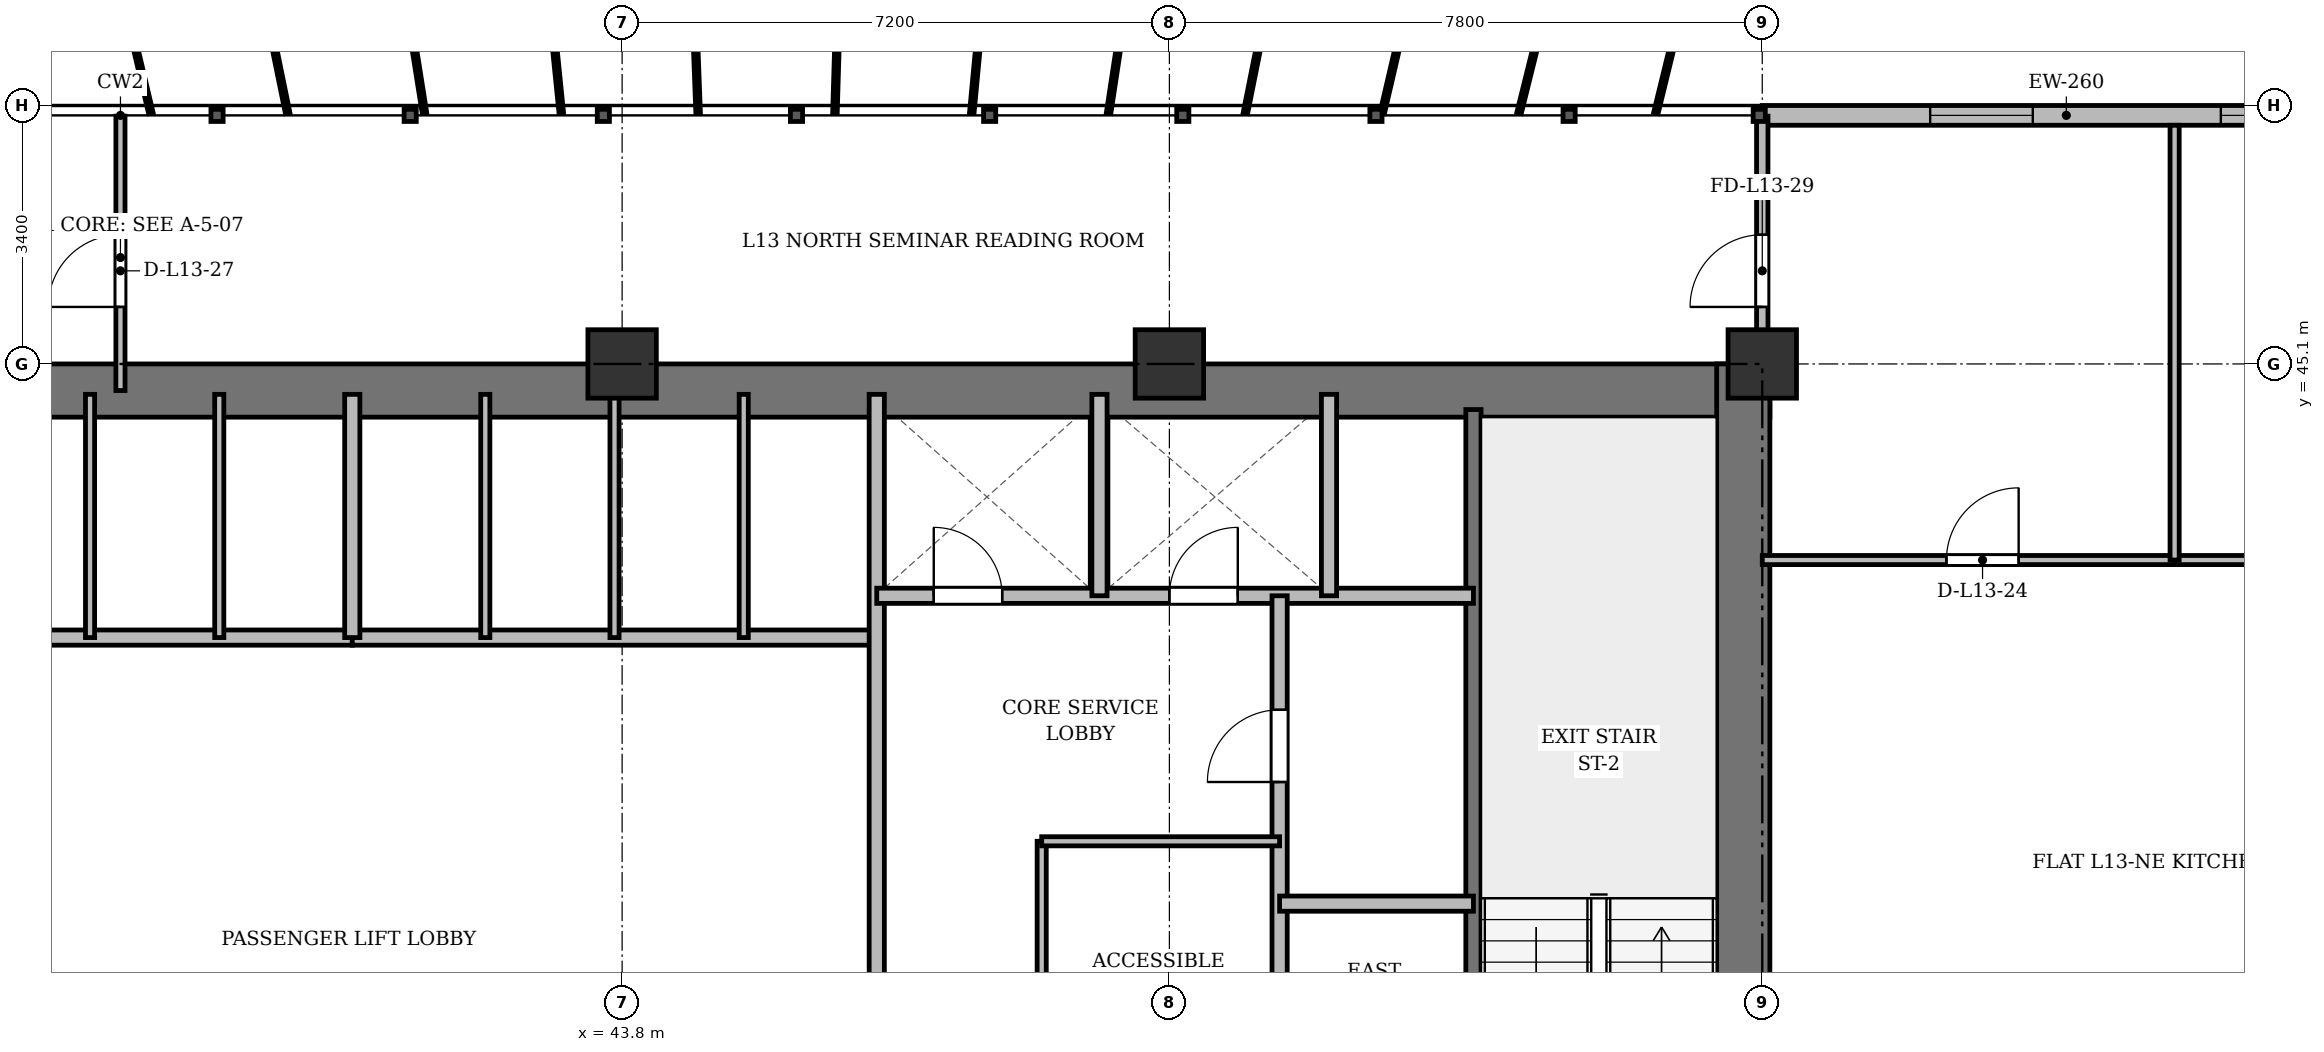
"""IFC4 building model, lengths in metres.
Left out: names, types, materials, properties, quantities, classifications, styles, units other than length and angle.
Written with IfcOpenShell. Run it as: python <this file> out.ifc"""

import sys

from ifc_helpers import new_model, si_unit, direction, frame, frame_2d, origin, origin_2d, place, context, subcontext, project, spatial, rectangle, extrude, source, transform, mapped, element, fill, save


model = new_model("IFC4")
c1 = context("Model", 3, precision=1e-05, world=origin(), true_north=direction((0.0, 1.0)))
c2 = subcontext(c1, "Body", "Model", "MODEL_VIEW")
j1 = project(units=[si_unit("LENGTHUNIT", "METRE"), si_unit("PLANEANGLEUNIT", "RADIAN")], contexts=[c1])
p1 = place(None, origin())
s1 = spatial("IfcSite", under=j1, at=p1, CompositionType="ELEMENT")
p2 = place(p1, origin())
s2 = spatial("IfcBuilding", under=s1, at=p2, CompositionType="ELEMENT")
p3 = place(p2, frame((0.0, 0.0, 52.3)))
s3 = spatial("IfcBuildingStorey", under=s2, at=p3, CompositionType="ELEMENT", Elevation=52.3)
m1 = source(origin(), c2, "Body", "SweptSolid", [
    extrude(rectangle(XDim=0.9, YDim=0.9, at=origin_2d()), origin(), (0.0, 0.0, 1.0), 3.6),
])
for number, where, z_axis, x_axis in (
    (1, (43.8, 45.1, 0.0), (0.0, 0.0, 1.0), (1.0, 0.0, 0.0)),
    (2, (51.0, 45.1, 0.0), (0.0, 0.0, 1.0), (1.0, 0.0, 0.0)),
    (3, (58.8, 45.1, 0.0), (0.0, 0.0, 1.0), (1.0, 0.0, 0.0)),
):
    element("IfcColumn", number, at=place(p3, frame(where, z_axis=z_axis, x_axis=x_axis)), inside=s3, PredefinedType="COLUMN", context=c2, shape_type="MappedRepresentation", body=[
        mapped(m1, transform((0.0, 0.0, 0.0), x_axis=(1.0, 0.0, 0.0), y_axis=(0.0, 1.0, 0.0), z_axis=(0.0, 0.0, 1.0), scale=1.0)),
    ])
p4 = place(p3, frame((58.8, 48.37, 0.0), z_axis=(0.0, 0.0, 1.0), x_axis=(1.0, 0.0, 0.0)))
e4 = element("IfcWall", 4, at=p4, inside=s3, PredefinedType="SOLIDWALL", context=c2, shape_type="SweptSolid", body=[
    extrude(rectangle(XDim=8.0, YDim=0.26, at=frame_2d((4.0, 0.0))), origin(), (0.0, 0.0, 1.0), 3.34),
])
p5 = place(p4, frame((2.209, 0.0, 0.9)))
e5 = element("IfcOpeningElement", 5, at=p5, cuts=e4, PredefinedType="OPENING", context=c2, shape_type="SweptSolid", body=[
    extrude(rectangle(XDim=1.35, YDim=1.5, at=frame_2d((0.675, 0.75))), frame((0.0, 0.14, 0.0), z_axis=(0.0, -1.0, 0.0), x_axis=(1.0, 0.0, 0.0)), (0.0, 0.0, 1.0), 0.28),
])
p6 = place(p4, frame((6.033, 0.0, 0.9)))
e6 = element("IfcOpeningElement", 6, at=p6, cuts=e4, PredefinedType="OPENING", context=c2, shape_type="SweptSolid", body=[
    extrude(rectangle(XDim=1.2, YDim=1.65, at=frame_2d((0.6, 0.825))), frame((0.0, 0.14, 0.0), z_axis=(0.0, -1.0, 0.0), x_axis=(1.0, 0.0, 0.0)), (0.0, 0.0, 1.0), 0.28),
])
p7 = place(p3, frame((15.5, 44.75, 0.0), z_axis=(0.0, 0.0, 1.0), x_axis=(1.0, 0.0, 0.0)))
e7 = element("IfcWall", 7, at=p7, inside=s3, PredefinedType="SHEAR", context=c2, shape_type="SweptSolid", body=[
    extrude(rectangle(XDim=43.4, YDim=0.7, at=frame_2d((21.7, 0.0))), origin(), (0.0, 0.0, 1.0), 3.34),
])
p8 = place(p3, frame((58.55, 33.4, 0.0), z_axis=(0.0, 0.0, 1.0), x_axis=(0.0, 1.0, 0.0)))
e8 = element("IfcWall", 8, at=p8, inside=s3, PredefinedType="SHEAR", context=c2, shape_type="SweptSolid", body=[
    extrude(rectangle(XDim=11.7, YDim=0.7, at=frame_2d((5.85, 0.0))), origin(), (0.0, 0.0, 1.0), 3.34),
])
p9 = place(p3, frame((55.0, 33.4, 0.0), z_axis=(0.0, 0.0, 1.0), x_axis=(0.0, 1.0, 0.0)))
e9 = element("IfcWall", 9, at=p9, inside=s3, PredefinedType="SHEAR", context=c2, shape_type="SweptSolid", body=[
    extrude(rectangle(XDim=11.1, YDim=0.2, at=frame_2d((5.55, 0.0))), origin(), (0.0, 0.0, 1.0), 3.34),
])
p10 = place(p9, frame((0.85, 0.0, 0.0)))
e10 = element("IfcOpeningElement", 10, at=p10, cuts=e9, PredefinedType="OPENING", context=c2, shape_type="SweptSolid", body=[
    extrude(rectangle(XDim=1.1, YDim=2.15, at=frame_2d((0.55, 1.075))), frame((0.0, 0.11, 0.0), z_axis=(0.0, -1.0, 0.0), x_axis=(1.0, 0.0, 0.0)), (0.0, 0.0, 1.0), 0.22),
])
p11 = place(p3, frame((33.35, 41.5, 0.0), z_axis=(0.0, 0.0, 1.0), x_axis=(1.0, 0.0, 0.0)))
e11 = element("IfcWall", 11, at=p11, inside=s3, PredefinedType="SOLIDWALL", context=c2, shape_type="SweptSolid", body=[
    extrude(rectangle(XDim=6.9, YDim=0.2, at=frame_2d((3.45, 0.0))), origin(), (0.0, 0.0, 1.0), 3.34),
])
for number, where, z_axis, x_axis in (
    (12, (36.8, 41.5, 0.0), (0.0, 0.0, 1.0), (0.0, 1.0, 0.0)),
    (13, (38.5, 41.5, 0.0), (0.0, 0.0, 1.0), (0.0, 1.0, 0.0)),
):
    element("IfcWall", number, at=place(p3, frame(where, z_axis=z_axis, x_axis=x_axis)), inside=s3, PredefinedType="PARTITIONING", context=c2, shape_type="SweptSolid", body=[
        extrude(rectangle(XDim=3.2, YDim=0.12, at=frame_2d((1.6, 0.0))), origin(), (0.0, 0.0, 1.0), 3.34),
    ])
p12 = place(p3, frame((40.25, 41.5, 0.0), z_axis=(0.0, 0.0, 1.0), x_axis=(1.0, 0.0, 0.0)))
e14 = element("IfcWall", 14, at=p12, inside=s3, PredefinedType="SOLIDWALL", context=c2, shape_type="SweptSolid", body=[
    extrude(rectangle(XDim=6.9, YDim=0.2, at=frame_2d((3.45, 0.0))), origin(), (0.0, 0.0, 1.0), 2.752),
])
p13 = place(p3, frame((40.25, 41.5, 0.0), z_axis=(0.0, 0.0, 1.0), x_axis=(0.0, 1.0, 0.0)))
e15 = element("IfcWall", 15, at=p13, inside=s3, PredefinedType="SOLIDWALL", context=c2, shape_type="SweptSolid", body=[
    extrude(rectangle(XDim=3.2, YDim=0.2, at=frame_2d((1.6, 0.0))), origin(), (0.0, 0.0, 1.0), 3.34),
])
p14 = place(p3, frame((42.0, 41.5, 0.0), z_axis=(0.0, 0.0, 1.0), x_axis=(0.0, 1.0, 0.0)))
e16 = element("IfcWall", 16, at=p14, inside=s3, PredefinedType="PARTITIONING", context=c2, shape_type="SweptSolid", body=[
    extrude(rectangle(XDim=3.2, YDim=0.12, at=frame_2d((1.6, 0.0))), origin(), (0.0, 0.0, 1.0), 3.34),
])
p15 = place(p3, frame((43.7, 41.5, 0.0), z_axis=(0.0, 0.0, 1.0), x_axis=(0.0, 1.0, 0.0)))
e17 = element("IfcWall", 17, at=p15, inside=s3, PredefinedType="PARTITIONING", context=c2, shape_type="SweptSolid", body=[
    extrude(rectangle(XDim=3.2, YDim=0.12, at=frame_2d((1.6, 0.0))), origin(), (0.0, 0.0, 1.0), 2.752),
])
p16 = place(p3, frame((45.4, 41.5, 0.0), z_axis=(0.0, 0.0, 1.0), x_axis=(0.0, 1.0, 0.0)))
e18 = element("IfcWall", 18, at=p16, inside=s3, PredefinedType="PARTITIONING", context=c2, shape_type="SweptSolid", body=[
    extrude(rectangle(XDim=3.2, YDim=0.12, at=frame_2d((1.6, 0.0))), origin(), (0.0, 0.0, 1.0), 3.34),
])
p17 = place(p3, frame((47.15, 33.4, 0.0), z_axis=(0.0, 0.0, 1.0), x_axis=(0.0, 1.0, 0.0)))
e19 = element("IfcWall", 19, at=p17, inside=s3, PredefinedType="SOLIDWALL", context=c2, shape_type="SweptSolid", body=[
    extrude(rectangle(XDim=11.3, YDim=0.2, at=frame_2d((5.65, 0.0))), origin(), (0.0, 0.0, 1.0), 2.69),
])
p18 = place(p3, frame((47.15, 42.05, 0.0), z_axis=(0.0, 0.0, 1.0), x_axis=(1.0, 0.0, 0.0)))
e20 = element("IfcWall", 20, at=p18, inside=s3, PredefinedType="SOLIDWALL", context=c2, shape_type="SweptSolid", body=[
    extrude(rectangle(XDim=7.85, YDim=0.2, at=frame_2d((3.925, 0.0))), origin(), (0.0, 0.0, 1.0), 2.752),
])
p19 = place(p18, frame((0.75, 0.0, 0.0)))
e21 = element("IfcOpeningElement", 21, at=p19, cuts=e20, PredefinedType="OPENING", context=c2, shape_type="SweptSolid", body=[
    extrude(rectangle(XDim=0.9, YDim=2.1, at=frame_2d((0.45, 1.05))), frame((0.0, 0.11, 0.0), z_axis=(0.0, -1.0, 0.0), x_axis=(1.0, 0.0, 0.0)), (0.0, 0.0, 1.0), 0.22),
])
p20 = place(p18, frame((3.85, 0.0, 0.0)))
e22 = element("IfcOpeningElement", 22, at=p20, cuts=e20, PredefinedType="OPENING", context=c2, shape_type="SweptSolid", body=[
    extrude(rectangle(XDim=0.9, YDim=2.1, at=frame_2d((0.45, 1.05))), frame((0.0, 0.11, 0.0), z_axis=(0.0, -1.0, 0.0), x_axis=(1.0, 0.0, 0.0)), (0.0, 0.0, 1.0), 0.22),
])
for number, where, z_axis, x_axis in (
    (23, (50.08, 42.05, 0.0), (0.0, 0.0, 1.0), (0.0, 1.0, 0.0)),
    (24, (53.1, 42.05, 0.0), (0.0, 0.0, 1.0), (0.0, 1.0, 0.0)),
):
    element("IfcWall", number, at=place(p3, frame(where, z_axis=z_axis, x_axis=x_axis)), inside=s3, PredefinedType="SOLIDWALL", context=c2, shape_type="SweptSolid", body=[
        extrude(rectangle(XDim=2.65, YDim=0.2, at=frame_2d((1.325, 0.0))), origin(), (0.0, 0.0, 1.0), 3.34),
    ])
p21 = place(p3, frame((52.45, 33.4, 0.0), z_axis=(0.0, 0.0, 1.0), x_axis=(0.0, 1.0, 0.0)))
e25 = element("IfcWall", 25, at=p21, inside=s3, PredefinedType="PARTITIONING", context=c2, shape_type="SweptSolid", body=[
    extrude(rectangle(XDim=8.65, YDim=0.2, at=frame_2d((4.325, 0.0))), origin(), (0.0, 0.0, 1.0), 2.69),
])
p22 = place(p21, frame((6.2, 0.0, 0.0)))
e26 = element("IfcOpeningElement", 26, at=p22, cuts=e25, PredefinedType="OPENING", context=c2, shape_type="SweptSolid", body=[
    extrude(rectangle(XDim=0.95, YDim=2.15, at=frame_2d((0.475, 1.075))), frame((0.0, 0.11, 0.0), z_axis=(0.0, -1.0, 0.0), x_axis=(1.0, 0.0, 0.0)), (0.0, 0.0, 1.0), 0.22),
])
p23 = place(p3, frame((52.45, 38.0, 0.0), z_axis=(0.0, 0.0, 1.0), x_axis=(1.0, 0.0, 0.0)))
e27 = element("IfcWall", 27, at=p23, inside=s3, PredefinedType="PARTITIONING", context=c2, shape_type="SweptSolid", body=[
    extrude(rectangle(XDim=2.55, YDim=0.2, at=frame_2d((1.275, 0.0))), origin(), (0.0, 0.0, 1.0), 3.34),
])
p24 = place(p3, frame((49.32, 33.4, 0.0), z_axis=(0.0, 0.0, 1.0), x_axis=(0.0, 1.0, 0.0)))
e28 = element("IfcWall", 28, at=p24, inside=s3, PredefinedType="PARTITIONING", context=c2, shape_type="SweptSolid", body=[
    extrude(rectangle(XDim=5.42, YDim=0.12, at=frame_2d((2.71, 0.0))), origin(), (0.0, 0.0, 1.0), 2.69),
])
p25 = place(p24, frame((1.6, 0.0, 0.0)))
e29 = element("IfcOpeningElement", 29, at=p25, cuts=e28, PredefinedType="OPENING", context=c2, shape_type="SweptSolid", body=[
    extrude(rectangle(XDim=0.95, YDim=2.15, at=frame_2d((0.475, 1.075))), frame((0.0, 0.07, 0.0), z_axis=(0.0, -1.0, 0.0), x_axis=(1.0, 0.0, 0.0)), (0.0, 0.0, 1.0), 0.14),
])
p26 = place(p3, frame((49.32, 38.82, 0.0), z_axis=(0.0, 0.0, 1.0), x_axis=(1.0, 0.0, 0.0)))
e30 = element("IfcWall", 30, at=p26, inside=s3, PredefinedType="PARTITIONING", context=c2, shape_type="SweptSolid", body=[
    extrude(rectangle(XDim=3.13, YDim=0.12, at=frame_2d((1.565, 0.0))), origin(), (0.0, 0.0, 1.0), 2.752),
])
p27 = place(p3, frame((58.8, 42.52, 0.0), z_axis=(0.0, 0.0, 1.0), x_axis=(1.0, 0.0, 0.0)))
e31 = element("IfcWall", 31, at=p27, inside=s3, PredefinedType="PARTITIONING", context=c2, shape_type="SweptSolid", body=[
    extrude(rectangle(XDim=5.425, YDim=0.12, at=frame_2d((2.712, 0.0))), origin(), (0.0, 0.0, 1.0), 2.752),
])
p28 = place(p27, frame((2.423, 0.0, 0.0)))
e32 = element("IfcOpeningElement", 32, at=p28, cuts=e31, PredefinedType="OPENING", context=c2, shape_type="SweptSolid", body=[
    extrude(rectangle(XDim=0.95, YDim=2.15, at=frame_2d((0.475, 1.075))), frame((0.0, 0.07, 0.0), z_axis=(0.0, -1.0, 0.0), x_axis=(1.0, 0.0, 0.0)), (0.0, 0.0, 1.0), 0.14),
])
p29 = place(p3, frame((64.225, 42.52, 0.0), z_axis=(0.0, 0.0, 1.0), x_axis=(1.0, 0.0, 0.0)))
e33 = element("IfcWall", 33, at=p29, inside=s3, PredefinedType="PARTITIONING", context=c2, shape_type="SweptSolid", body=[
    extrude(rectangle(XDim=5.425, YDim=0.12, at=frame_2d((2.712, 0.0))), origin(), (0.0, 0.0, 1.0), 2.752),
])
p30 = place(p29, frame((2.052, 0.0, 0.0)))
e34 = element("IfcOpeningElement", 34, at=p30, cuts=e33, PredefinedType="OPENING", context=c2, shape_type="SweptSolid", body=[
    extrude(rectangle(XDim=0.95, YDim=2.15, at=frame_2d((0.475, 1.075))), frame((0.0, 0.07, 0.0), z_axis=(0.0, -1.0, 0.0), x_axis=(1.0, 0.0, 0.0)), (0.0, 0.0, 1.0), 0.14),
])
p31 = place(p3, frame((64.225, 42.52, 0.0), z_axis=(0.0, 0.0, 1.0), x_axis=(0.0, 1.0, 0.0)))
e35 = element("IfcWall", 35, at=p31, inside=s3, PredefinedType="PARTITIONING", context=c2, shape_type="SweptSolid", body=[
    extrude(rectangle(XDim=5.72, YDim=0.12, at=frame_2d((2.86, 0.0))), origin(), (0.0, 0.0, 1.0), 2.69),
])
p32 = place(p3, frame((37.2, 44.75, 0.0), z_axis=(0.0, 0.0, 1.0), x_axis=(0.0, 1.0, 0.0)))
e36 = element("IfcWall", 36, at=p32, inside=s3, PredefinedType="PARTITIONING", context=c2, shape_type="SweptSolid", body=[
    extrude(rectangle(XDim=3.61, YDim=0.12, at=frame_2d((1.805, 0.0))), origin(), (0.0, 0.0, 1.0), 2.69),
])
p33 = place(p32, frame((1.1, 0.0, 0.0)))
e37 = element("IfcOpeningElement", 37, at=p33, cuts=e36, PredefinedType="OPENING", context=c2, shape_type="SweptSolid", body=[
    extrude(rectangle(XDim=0.95, YDim=2.15, at=frame_2d((0.475, 1.075))), frame((0.0, 0.07, 0.0), z_axis=(0.0, -1.0, 0.0), x_axis=(1.0, 0.0, 0.0)), (0.0, 0.0, 1.0), 0.14),
])
p34 = place(p3, frame((58.8, 44.75, 0.0), z_axis=(0.0, 0.0, 1.0), x_axis=(0.0, 1.0, 0.0)))
e38 = element("IfcWall", 38, at=p34, inside=s3, PredefinedType="PARTITIONING", context=c2, shape_type="SweptSolid", body=[
    extrude(rectangle(XDim=3.61, YDim=0.15, at=frame_2d((1.805, 0.0))), origin(), (0.0, 0.0, 1.0), 2.752),
])
p35 = place(p34, frame((1.1, 0.0, 0.0)))
e39 = element("IfcOpeningElement", 39, at=p35, cuts=e38, PredefinedType="OPENING", context=c2, shape_type="SweptSolid", body=[
    extrude(rectangle(XDim=0.95, YDim=2.15, at=frame_2d((0.475, 1.075))), frame((0.0, 0.085, 0.0), z_axis=(0.0, -1.0, 0.0), x_axis=(1.0, 0.0, 0.0)), (0.0, 0.0, 1.0), 0.17),
])
m2 = source(origin(), c2, "Body", "SweptSolid", [
    extrude(rectangle(XDim=1.35, YDim=1.5, at=frame_2d((0.675, 0.75))), frame((0.0, 0.03, 0.0), z_axis=(0.0, -1.0, 0.0), x_axis=(1.0, 0.0, 0.0)), (0.0, 0.0, 1.0), 0.06),
])
p36 = place(p5, origin())
e40 = element("IfcWindow", 40, at=p36, inside=s3, PartitioningType="SINGLE_PANEL", PredefinedType="WINDOW", context=c2, shape_type="MappedRepresentation", body=[
    mapped(m2, transform((0.0, 0.0, 0.0), x_axis=(1.0, 0.0, 0.0), y_axis=(0.0, 1.0, 0.0), z_axis=(0.0, 0.0, 1.0), scale=1.0)),
])
fill(e5, e40)
m3 = source(origin(), c2, "Body", "SweptSolid", [
    extrude(rectangle(XDim=1.2, YDim=1.65, at=frame_2d((0.6, 0.825))), frame((0.0, 0.03, 0.0), z_axis=(0.0, -1.0, 0.0), x_axis=(1.0, 0.0, 0.0)), (0.0, 0.0, 1.0), 0.06),
])
p37 = place(p6, origin())
e41 = element("IfcWindow", 41, at=p37, inside=s3, PartitioningType="SINGLE_PANEL", PredefinedType="WINDOW", context=c2, shape_type="MappedRepresentation", body=[
    mapped(m3, transform((0.0, 0.0, 0.0), x_axis=(1.0, 0.0, 0.0), y_axis=(0.0, 1.0, 0.0), z_axis=(0.0, 0.0, 1.0), scale=1.0)),
])
fill(e6, e41)
m4 = source(origin(), c2, "Body", "SweptSolid", [
    extrude(rectangle(XDim=0.9, YDim=2.1, at=frame_2d((0.45, 1.05))), frame((0.0, 0.025, 0.0), z_axis=(0.0, -1.0, 0.0), x_axis=(1.0, 0.0, 0.0)), (0.0, 0.0, 1.0), 0.05),
])
p38 = place(p19, origin())
e42 = element("IfcDoor", 42, at=p38, inside=s3, OperationType="SINGLE_SWING_LEFT", PredefinedType="DOOR", context=c2, shape_type="MappedRepresentation", body=[
    mapped(m4, transform((0.0, 0.0, 0.0), x_axis=(1.0, 0.0, 0.0), y_axis=(0.0, 1.0, 0.0), z_axis=(0.0, 0.0, 1.0), scale=1.0)),
])
fill(e21, e42)
p39 = place(p20, origin())
e43 = element("IfcDoor", 43, at=p39, inside=s3, OperationType="SINGLE_SWING_RIGHT", PredefinedType="DOOR", context=c2, shape_type="MappedRepresentation", body=[
    mapped(m4, transform((0.0, 0.0, 0.0), x_axis=(1.0, 0.0, 0.0), y_axis=(0.0, 1.0, 0.0), z_axis=(0.0, 0.0, 1.0), scale=1.0)),
])
fill(e22, e43)
m5 = source(origin(), c2, "Body", "SweptSolid", [
    extrude(rectangle(XDim=0.95, YDim=2.15, at=frame_2d((0.475, 1.075))), frame((0.0, 0.025, 0.0), z_axis=(0.0, -1.0, 0.0), x_axis=(1.0, 0.0, 0.0)), (0.0, 0.0, 1.0), 0.05),
])
p40 = place(p22, origin())
e44 = element("IfcDoor", 44, at=p40, inside=s3, OperationType="SINGLE_SWING_LEFT", PredefinedType="DOOR", context=c2, shape_type="MappedRepresentation", body=[
    mapped(m5, transform((0.0, 0.0, 0.0), x_axis=(1.0, 0.0, 0.0), y_axis=(0.0, 1.0, 0.0), z_axis=(0.0, 0.0, 1.0), scale=1.0)),
])
fill(e26, e44)
p41 = place(p28, origin())
e45 = element("IfcDoor", 45, at=p41, inside=s3, OperationType="SINGLE_SWING_RIGHT", PredefinedType="DOOR", context=c2, shape_type="MappedRepresentation", body=[
    mapped(m5, transform((0.0, 0.0, 0.0), x_axis=(1.0, 0.0, 0.0), y_axis=(0.0, 1.0, 0.0), z_axis=(0.0, 0.0, 1.0), scale=1.0)),
])
fill(e32, e45)
p42 = place(p33, origin())
e46 = element("IfcDoor", 46, at=p42, inside=s3, OperationType="SINGLE_SWING_LEFT", PredefinedType="DOOR", context=c2, shape_type="MappedRepresentation", body=[
    mapped(m5, transform((0.0, 0.0, 0.0), x_axis=(1.0, 0.0, 0.0), y_axis=(0.0, 1.0, 0.0), z_axis=(0.0, 0.0, 1.0), scale=1.0)),
])
fill(e37, e46)
p43 = place(p35, origin())
e47 = element("IfcDoor", 47, at=p43, inside=s3, OperationType="SINGLE_SWING_LEFT", PredefinedType="DOOR", context=c2, shape_type="MappedRepresentation", body=[
    mapped(m5, transform((0.0, 0.0, 0.0), x_axis=(1.0, 0.0, 0.0), y_axis=(0.0, 1.0, 0.0), z_axis=(0.0, 0.0, 1.0), scale=1.0)),
])
fill(e39, e47)
save(model, sys.argv[1])
